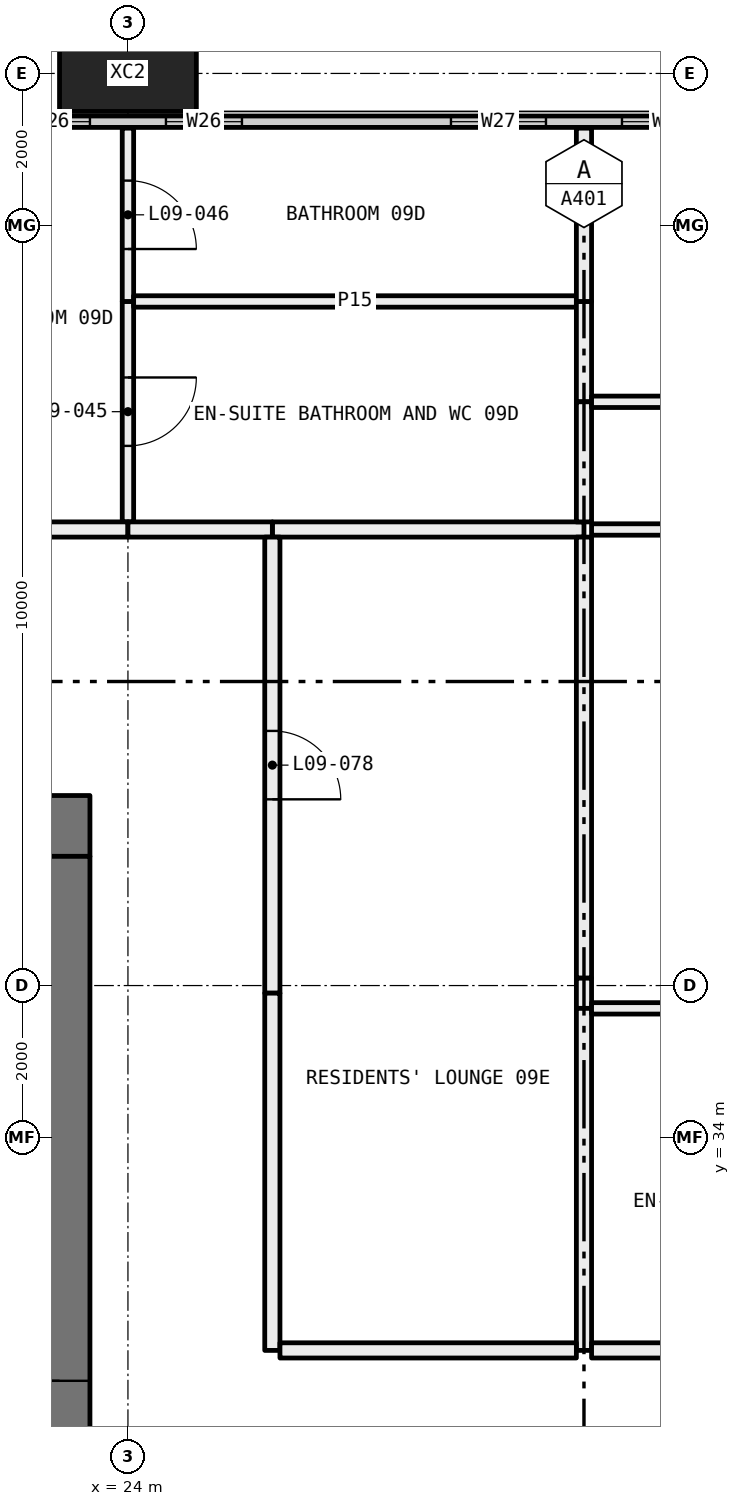
"""IFC4 building model, lengths in metres.
Left out: names, types, materials, properties, quantities, classifications, styles, units other than length and angle.
Written with IfcOpenShell. Run it as: python <this file> out.ifc"""

import sys

from ifc_helpers import new_model, si_unit, direction, frame, frame_2d, origin, origin_2d, place, context, subcontext, project, spatial, rectangle, hollow_rectangle, extrude, element, fill, save


model = new_model("IFC4")
c1 = context("Model", 3, precision=1e-05, world=origin(), true_north=direction((0.0, 1.0)))
c2 = subcontext(c1, "Body", "Model", "MODEL_VIEW")
j1 = project(units=[si_unit("LENGTHUNIT", "METRE"), si_unit("PLANEANGLEUNIT", "RADIAN")], contexts=[c1])
p1 = place(None, origin())
s1 = spatial("IfcSite", under=j1, at=p1, CompositionType="ELEMENT")
p2 = place(p1, origin())
s2 = spatial("IfcBuilding", under=s1, at=p2, CompositionType="ELEMENT")
p3 = place(p2, frame((0.0, 0.0, 43.8)))
s3 = spatial("IfcBuildingStorey", under=s2, at=p3, CompositionType="ELEMENT", Elevation=43.8)
p4 = place(p3, frame((24.0, 48.0, -0.4), z_axis=(0.0, 0.0, 1.0), x_axis=(1.0, 0.0, 0.0)))
e1 = element("IfcColumn", 1, at=p4, inside=s3, PredefinedType="COLUMN", context=c2, shape_type="SweptSolid", body=[
    extrude(hollow_rectangle(XDim=1.8, YDim=1.0, WallThickness=0.07, at=origin_2d()), origin(), (0.0, 0.0, 1.0), 3.45),
])
p5 = place(p3, frame((6.56, 47.365, 0.0), z_axis=(0.0, 0.0, 1.0), x_axis=(1.0, 0.0, 0.0)))
e2 = element("IfcWall", 2, at=p5, inside=s3, PredefinedType="ELEMENTEDWALL", context=c2, shape_type="SweptSolid", body=[
    extrude(rectangle(XDim=58.88, YDim=0.15, at=frame_2d((29.44, 0.0))), origin(), (0.0, 0.0, 1.0), 3.05),
])
p6 = place(p5, frame((0.44, 0.0, 0.45)))
e3 = element("IfcOpeningElement", 3, at=p6, cuts=e2, PredefinedType="OPENING", context=c2, shape_type="SweptSolid", body=[
    extrude(rectangle(XDim=4.5, YDim=2.55, at=frame_2d((2.25, 1.275))), frame((0.0, 0.085, 0.0), z_axis=(0.0, -1.0, 0.0), x_axis=(1.0, 0.0, 0.0)), (0.0, 0.0, 1.0), 0.17),
])
p7 = place(p5, frame((5.94, 0.0, 0.45)))
e4 = element("IfcOpeningElement", 4, at=p7, cuts=e2, PredefinedType="OPENING", context=c2, shape_type="SweptSolid", body=[
    extrude(rectangle(XDim=1.0, YDim=2.55, at=frame_2d((0.5, 1.275))), frame((0.0, 0.085, 0.0), z_axis=(0.0, -1.0, 0.0), x_axis=(1.0, 0.0, 0.0)), (0.0, 0.0, 1.0), 0.17),
])
p8 = place(p5, frame((9.69, 0.0, 0.45)))
e5 = element("IfcOpeningElement", 5, at=p8, cuts=e2, PredefinedType="OPENING", context=c2, shape_type="SweptSolid", body=[
    extrude(rectangle(XDim=1.25, YDim=2.55, at=frame_2d((0.625, 1.275))), frame((0.0, 0.085, 0.0), z_axis=(0.0, -1.0, 0.0), x_axis=(1.0, 0.0, 0.0)), (0.0, 0.0, 1.0), 0.17),
])
p9 = place(p5, frame((11.94, 0.0, 0.45)))
e6 = element("IfcOpeningElement", 6, at=p9, cuts=e2, PredefinedType="OPENING", context=c2, shape_type="SweptSolid", body=[
    extrude(rectangle(XDim=1.25, YDim=2.55, at=frame_2d((0.625, 1.275))), frame((0.0, 0.085, 0.0), z_axis=(0.0, -1.0, 0.0), x_axis=(1.0, 0.0, 0.0)), (0.0, 0.0, 1.0), 0.17),
])
p10 = place(p5, frame((15.94, 0.0, 0.45)))
e7 = element("IfcOpeningElement", 7, at=p10, cuts=e2, PredefinedType="OPENING", context=c2, shape_type="SweptSolid", body=[
    extrude(rectangle(XDim=1.0, YDim=2.55, at=frame_2d((0.5, 1.275))), frame((0.0, 0.085, 0.0), z_axis=(0.0, -1.0, 0.0), x_axis=(1.0, 0.0, 0.0)), (0.0, 0.0, 1.0), 0.17),
])
p11 = place(p5, frame((17.94, 0.0, 0.45)))
e8 = element("IfcOpeningElement", 8, at=p11, cuts=e2, PredefinedType="OPENING", context=c2, shape_type="SweptSolid", body=[
    extrude(rectangle(XDim=1.0, YDim=2.55, at=frame_2d((0.5, 1.275))), frame((0.0, 0.085, 0.0), z_axis=(0.0, -1.0, 0.0), x_axis=(1.0, 0.0, 0.0)), (0.0, 0.0, 1.0), 0.17),
])
p12 = place(p5, frame((21.69, 0.0, 0.45)))
e9 = element("IfcOpeningElement", 9, at=p12, cuts=e2, PredefinedType="OPENING", context=c2, shape_type="SweptSolid", body=[
    extrude(rectangle(XDim=1.25, YDim=2.55, at=frame_2d((0.625, 1.275))), frame((0.0, 0.085, 0.0), z_axis=(0.0, -1.0, 0.0), x_axis=(1.0, 0.0, 0.0)), (0.0, 0.0, 1.0), 0.17),
])
p13 = place(p5, frame((23.94, 0.0, 0.45)))
e10 = element("IfcOpeningElement", 10, at=p13, cuts=e2, PredefinedType="OPENING", context=c2, shape_type="SweptSolid", body=[
    extrude(rectangle(XDim=1.25, YDim=2.55, at=frame_2d((0.625, 1.275))), frame((0.0, 0.085, 0.0), z_axis=(0.0, -1.0, 0.0), x_axis=(1.0, 0.0, 0.0)), (0.0, 0.0, 1.0), 0.17),
])
p14 = place(p5, frame((27.94, 0.0, 0.45)))
e11 = element("IfcOpeningElement", 11, at=p14, cuts=e2, PredefinedType="OPENING", context=c2, shape_type="SweptSolid", body=[
    extrude(rectangle(XDim=1.0, YDim=2.55, at=frame_2d((0.5, 1.275))), frame((0.0, 0.085, 0.0), z_axis=(0.0, -1.0, 0.0), x_axis=(1.0, 0.0, 0.0)), (0.0, 0.0, 1.0), 0.17),
])
p15 = place(p5, frame((29.94, 0.0, 0.45)))
e12 = element("IfcOpeningElement", 12, at=p15, cuts=e2, PredefinedType="OPENING", context=c2, shape_type="SweptSolid", body=[
    extrude(rectangle(XDim=1.0, YDim=2.55, at=frame_2d((0.5, 1.275))), frame((0.0, 0.085, 0.0), z_axis=(0.0, -1.0, 0.0), x_axis=(1.0, 0.0, 0.0)), (0.0, 0.0, 1.0), 0.17),
])
p16 = place(p5, frame((33.69, 0.0, 0.45)))
e13 = element("IfcOpeningElement", 13, at=p16, cuts=e2, PredefinedType="OPENING", context=c2, shape_type="SweptSolid", body=[
    extrude(rectangle(XDim=1.25, YDim=2.55, at=frame_2d((0.625, 1.275))), frame((0.0, 0.085, 0.0), z_axis=(0.0, -1.0, 0.0), x_axis=(1.0, 0.0, 0.0)), (0.0, 0.0, 1.0), 0.17),
])
p17 = place(p5, frame((35.94, 0.0, 0.45)))
e14 = element("IfcOpeningElement", 14, at=p17, cuts=e2, PredefinedType="OPENING", context=c2, shape_type="SweptSolid", body=[
    extrude(rectangle(XDim=1.25, YDim=2.55, at=frame_2d((0.625, 1.275))), frame((0.0, 0.085, 0.0), z_axis=(0.0, -1.0, 0.0), x_axis=(1.0, 0.0, 0.0)), (0.0, 0.0, 1.0), 0.17),
])
p18 = place(p5, frame((39.94, 0.0, 0.45)))
e15 = element("IfcOpeningElement", 15, at=p18, cuts=e2, PredefinedType="OPENING", context=c2, shape_type="SweptSolid", body=[
    extrude(rectangle(XDim=1.0, YDim=2.55, at=frame_2d((0.5, 1.275))), frame((0.0, 0.085, 0.0), z_axis=(0.0, -1.0, 0.0), x_axis=(1.0, 0.0, 0.0)), (0.0, 0.0, 1.0), 0.17),
])
p19 = place(p5, frame((41.94, 0.0, 0.45)))
e16 = element("IfcOpeningElement", 16, at=p19, cuts=e2, PredefinedType="OPENING", context=c2, shape_type="SweptSolid", body=[
    extrude(rectangle(XDim=1.0, YDim=2.55, at=frame_2d((0.5, 1.275))), frame((0.0, 0.085, 0.0), z_axis=(0.0, -1.0, 0.0), x_axis=(1.0, 0.0, 0.0)), (0.0, 0.0, 1.0), 0.17),
])
p20 = place(p5, frame((45.69, 0.0, 0.45)))
e17 = element("IfcOpeningElement", 17, at=p20, cuts=e2, PredefinedType="OPENING", context=c2, shape_type="SweptSolid", body=[
    extrude(rectangle(XDim=1.25, YDim=2.55, at=frame_2d((0.625, 1.275))), frame((0.0, 0.085, 0.0), z_axis=(0.0, -1.0, 0.0), x_axis=(1.0, 0.0, 0.0)), (0.0, 0.0, 1.0), 0.17),
])
p21 = place(p5, frame((47.94, 0.0, 0.45)))
e18 = element("IfcOpeningElement", 18, at=p21, cuts=e2, PredefinedType="OPENING", context=c2, shape_type="SweptSolid", body=[
    extrude(rectangle(XDim=1.25, YDim=2.55, at=frame_2d((0.625, 1.275))), frame((0.0, 0.085, 0.0), z_axis=(0.0, -1.0, 0.0), x_axis=(1.0, 0.0, 0.0)), (0.0, 0.0, 1.0), 0.17),
])
p22 = place(p5, frame((51.94, 0.0, 0.45)))
e19 = element("IfcOpeningElement", 19, at=p22, cuts=e2, PredefinedType="OPENING", context=c2, shape_type="SweptSolid", body=[
    extrude(rectangle(XDim=1.0, YDim=2.55, at=frame_2d((0.5, 1.275))), frame((0.0, 0.085, 0.0), z_axis=(0.0, -1.0, 0.0), x_axis=(1.0, 0.0, 0.0)), (0.0, 0.0, 1.0), 0.17),
])
p23 = place(p5, frame((53.94, 0.0, 0.45)))
e20 = element("IfcOpeningElement", 20, at=p23, cuts=e2, PredefinedType="OPENING", context=c2, shape_type="SweptSolid", body=[
    extrude(rectangle(XDim=4.5, YDim=2.55, at=frame_2d((2.25, 1.275))), frame((0.0, 0.085, 0.0), z_axis=(0.0, -1.0, 0.0), x_axis=(1.0, 0.0, 0.0)), (0.0, 0.0, 1.0), 0.17),
])
p24 = place(p3, frame((24.0, 42.1, 0.0), z_axis=(0.0, 0.0, 1.0), x_axis=(0.0, 1.0, 0.0)))
e21 = element("IfcWall", 21, at=p24, inside=s3, PredefinedType="PARTITIONING", context=c2, shape_type="SweptSolid", body=[
    extrude(rectangle(XDim=2.9, YDim=0.15, at=frame_2d((1.45, 0.0))), origin(), (0.0, 0.0, 1.0), 3.05),
])
p25 = place(p24, frame((1.0, 0.0, 0.0)))
e22 = element("IfcOpeningElement", 22, at=p25, cuts=e21, PredefinedType="OPENING", context=c2, shape_type="SweptSolid", body=[
    extrude(rectangle(XDim=0.9, YDim=2.1, at=frame_2d((0.45, 1.05))), frame((0.0, 0.085, 0.0), z_axis=(0.0, -1.0, 0.0), x_axis=(1.0, 0.0, 0.0)), (0.0, 0.0, 1.0), 0.17),
])
p26 = place(p3, frame((24.0, 45.0, 0.0), z_axis=(0.0, 0.0, 1.0), x_axis=(0.0, 1.0, 0.0)))
e23 = element("IfcWall", 23, at=p26, inside=s3, PredefinedType="PARTITIONING", context=c2, shape_type="SweptSolid", body=[
    extrude(rectangle(XDim=2.28, YDim=0.15, at=frame_2d((1.14, 0.0))), origin(), (0.0, 0.0, 1.0), 3.05),
])
p27 = place(p26, frame((0.69, 0.0, 0.0)))
e24 = element("IfcOpeningElement", 24, at=p27, cuts=e23, PredefinedType="OPENING", context=c2, shape_type="SweptSolid", body=[
    extrude(rectangle(XDim=0.9, YDim=2.1, at=frame_2d((0.45, 1.05))), frame((0.0, 0.085, 0.0), z_axis=(0.0, -1.0, 0.0), x_axis=(1.0, 0.0, 0.0)), (0.0, 0.0, 1.0), 0.17),
])
p28 = place(p3, frame((18.0, 42.0, 0.0), z_axis=(0.0, 0.0, 1.0), x_axis=(1.0, 0.0, 0.0)))
e25 = element("IfcWall", 25, at=p28, inside=s3, PredefinedType="PARTITIONING", context=c2, shape_type="SweptSolid", body=[
    extrude(rectangle(XDim=6.0, YDim=0.2, at=frame_2d((3.0, 0.0))), origin(), (0.0, 0.0, 1.0), 3.05),
])
p29 = place(p3, frame((29.9, 45.0, 0.0), z_axis=(0.0, 0.0, 1.0), x_axis=(-1.0, 0.0, 0.0)))
e26 = element("IfcWall", 26, at=p29, inside=s3, PredefinedType="PARTITIONING", context=c2, shape_type="SweptSolid", body=[
    extrude(rectangle(XDim=5.825, YDim=0.15, at=frame_2d((2.913, 0.0))), origin(), (0.0, 0.0, 1.0), 3.05),
])
p30 = place(p3, frame((25.9, 42.0, 0.0), z_axis=(0.0, 0.0, 1.0), x_axis=(1.0, 0.0, 0.0)))
e27 = element("IfcWall", 27, at=p30, inside=s3, PredefinedType="PARTITIONING", context=c2, shape_type="SweptSolid", body=[
    extrude(rectangle(XDim=4.1, YDim=0.2, at=frame_2d((2.05, 0.0))), origin(), (0.0, 0.0, 1.0), 3.05),
])
p31 = place(p3, frame((30.0, 43.68, 0.0), z_axis=(0.0, 0.0, 1.0), x_axis=(0.0, 1.0, 0.0)))
e28 = element("IfcWall", 28, at=p31, inside=s3, PredefinedType="PARTITIONING", context=c2, shape_type="SweptSolid", body=[
    extrude(rectangle(XDim=1.32, YDim=0.2, at=frame_2d((0.66, 0.0))), origin(), (0.0, 0.0, 1.0), 3.05),
])
p32 = place(p3, frame((30.0, 42.1, 0.0), z_axis=(0.0, 0.0, 1.0), x_axis=(0.0, 1.0, 0.0)))
e29 = element("IfcWall", 29, at=p32, inside=s3, PredefinedType="PARTITIONING", context=c2, shape_type="SweptSolid", body=[
    extrude(rectangle(XDim=1.58, YDim=0.2, at=frame_2d((0.79, 0.0))), origin(), (0.0, 0.0, 1.0), 3.05),
])
p33 = place(p3, frame((24.0, 42.0, 0.0), z_axis=(0.0, 0.0, 1.0), x_axis=(1.0, 0.0, 0.0)))
e30 = element("IfcWall", 30, at=p33, inside=s3, PredefinedType="PARTITIONING", context=c2, shape_type="SweptSolid", body=[
    extrude(rectangle(XDim=1.9, YDim=0.2, at=frame_2d((0.95, 0.0))), origin(), (0.0, 0.0, 1.0), 3.05),
])
p34 = place(p3, frame((30.0, 45.0, 0.0), z_axis=(0.0, 0.0, 1.0), x_axis=(0.0, 1.0, 0.0)))
e31 = element("IfcWall", 31, at=p34, inside=s3, PredefinedType="PARTITIONING", context=c2, shape_type="SweptSolid", body=[
    extrude(rectangle(XDim=2.28, YDim=0.2, at=frame_2d((1.14, 0.0))), origin(), (0.0, 0.0, 1.0), 3.05),
])
p35 = place(p3, frame((30.0, 35.7, 0.0), z_axis=(0.0, 0.0, 1.0), x_axis=(0.0, 1.0, 0.0)))
e32 = element("IfcWall", 32, at=p35, inside=s3, PredefinedType="PARTITIONING", context=c2, shape_type="SweptSolid", body=[
    extrude(rectangle(XDim=0.4, YDim=0.2, at=frame_2d((0.2, 0.0))), origin(), (0.0, 0.0, 1.0), 2.45),
])
p36 = place(p3, frame((30.0, 36.1, 0.0), z_axis=(0.0, 0.0, 1.0), x_axis=(0.0, 1.0, 0.0)))
e33 = element("IfcWall", 33, at=p36, inside=s3, PredefinedType="PARTITIONING", context=c2, shape_type="SweptSolid", body=[
    extrude(rectangle(XDim=5.8, YDim=0.2, at=frame_2d((2.9, 0.0))), origin(), (0.0, 0.0, 1.0), 3.05),
])
p37 = place(p3, frame((30.0, 31.2, 0.0), z_axis=(0.0, 0.0, 1.0), x_axis=(0.0, 1.0, 0.0)))
e34 = element("IfcWall", 34, at=p37, inside=s3, PredefinedType="PARTITIONING", context=c2, shape_type="SweptSolid", body=[
    extrude(rectangle(XDim=4.5, YDim=0.2, at=frame_2d((2.25, 0.0))), origin(), (0.0, 0.0, 1.0), 3.05),
])
p38 = place(p3, frame((25.9, 41.9, 0.0), z_axis=(0.0, 0.0, 1.0), x_axis=(0.0, -1.0, 0.0)))
e35 = element("IfcWall", 35, at=p38, inside=s3, PredefinedType="PARTITIONING", context=c2, shape_type="SweptSolid", body=[
    extrude(rectangle(XDim=6.0, YDim=0.2, at=frame_2d((3.0, 0.0))), origin(), (0.0, 0.0, 1.0), 2.45),
])
p39 = place(p38, frame((2.55, 0.0, 0.0)))
e36 = element("IfcOpeningElement", 36, at=p39, cuts=e35, PredefinedType="OPENING", context=c2, shape_type="SweptSolid", body=[
    extrude(rectangle(XDim=0.9, YDim=2.1, at=frame_2d((0.45, 1.05))), frame((0.0, 0.11, 0.0), z_axis=(0.0, -1.0, 0.0), x_axis=(1.0, 0.0, 0.0)), (0.0, 0.0, 1.0), 0.22),
])
p40 = place(p3, frame((25.9, 35.9, 0.0), z_axis=(0.0, 0.0, 1.0), x_axis=(0.0, -1.0, 0.0)))
e37 = element("IfcWall", 37, at=p40, inside=s3, PredefinedType="PARTITIONING", context=c2, shape_type="SweptSolid", body=[
    extrude(rectangle(XDim=4.7, YDim=0.2, at=frame_2d((2.35, 0.0))), origin(), (0.0, 0.0, 1.0), 3.05),
])
p41 = place(p3, frame((26.0, 31.2, 0.0), z_axis=(0.0, 0.0, 1.0), x_axis=(1.0, 0.0, 0.0)))
e38 = element("IfcWall", 38, at=p41, inside=s3, PredefinedType="PARTITIONING", context=c2, shape_type="SweptSolid", body=[
    extrude(rectangle(XDim=3.9, YDim=0.2, at=frame_2d((1.95, 0.0))), origin(), (0.0, 0.0, 1.0), 3.05),
])
p42 = place(p3, frame((30.1, 43.68, 0.0), z_axis=(0.0, 0.0, 1.0), x_axis=(1.0, 0.0, 0.0)))
e39 = element("IfcWall", 39, at=p42, inside=s3, PredefinedType="PARTITIONING", context=c2, shape_type="SweptSolid", body=[
    extrude(rectangle(XDim=5.9, YDim=0.15, at=frame_2d((2.95, 0.0))), origin(), (0.0, 0.0, 1.0), 2.45),
])
p43 = place(p3, frame((30.1, 42.0, 0.0), z_axis=(0.0, 0.0, 1.0), x_axis=(1.0, 0.0, 0.0)))
e40 = element("IfcWall", 40, at=p43, inside=s3, PredefinedType="PARTITIONING", context=c2, shape_type="SweptSolid", body=[
    extrude(rectangle(XDim=5.825, YDim=0.15, at=frame_2d((2.913, 0.0))), origin(), (0.0, 0.0, 1.0), 2.45),
])
p44 = place(p3, frame((30.1, 35.7, 0.0), z_axis=(0.0, 0.0, 1.0), x_axis=(1.0, 0.0, 0.0)))
e41 = element("IfcWall", 41, at=p44, inside=s3, PredefinedType="PARTITIONING", context=c2, shape_type="SweptSolid", body=[
    extrude(rectangle(XDim=4.4, YDim=0.15, at=frame_2d((2.2, 0.0))), origin(), (0.0, 0.0, 1.0), 3.05),
])
p45 = place(p44, frame((1.75, 0.0, 0.0)))
e42 = element("IfcOpeningElement", 42, at=p45, cuts=e41, PredefinedType="OPENING", context=c2, shape_type="SweptSolid", body=[
    extrude(rectangle(XDim=0.9, YDim=2.1, at=frame_2d((0.45, 1.05))), frame((0.0, 0.085, 0.0), z_axis=(0.0, -1.0, 0.0), x_axis=(1.0, 0.0, 0.0)), (0.0, 0.0, 1.0), 0.17),
])
p46 = place(p3, frame((30.1, 31.2, 0.0), z_axis=(0.0, 0.0, 1.0), x_axis=(1.0, 0.0, 0.0)))
e43 = element("IfcWall", 43, at=p46, inside=s3, PredefinedType="PARTITIONING", context=c2, shape_type="SweptSolid", body=[
    extrude(rectangle(XDim=4.4, YDim=0.2, at=frame_2d((2.2, 0.0))), origin(), (0.0, 0.0, 1.0), 3.05),
])
p47 = place(p3, frame((12.5, 38.1, 0.0), z_axis=(0.0, 0.0, 1.0), x_axis=(1.0, 0.0, 0.0)))
e44 = element("IfcWall", 44, at=p47, inside=s3, PredefinedType="SHEAR", context=c2, shape_type="SweptSolid", body=[
    extrude(rectangle(XDim=11.0, YDim=0.8, at=frame_2d((5.5, 0.0))), origin(), (0.0, 0.0, 1.0), 3.05),
])
p48 = place(p47, frame((8.4, 0.0, 0.0)))
e45 = element("IfcOpeningElement", 45, at=p48, cuts=e44, PredefinedType="OPENING", context=c2, shape_type="SweptSolid", body=[
    extrude(rectangle(XDim=1.6, YDim=2.1, at=frame_2d((0.8, 1.05))), frame((0.0, 0.41, 0.0), z_axis=(0.0, -1.0, 0.0), x_axis=(1.0, 0.0, 0.0)), (0.0, 0.0, 1.0), 0.82),
])
p49 = place(p3, frame((23.1, 22.3, 0.0), z_axis=(0.0, 0.0, 1.0), x_axis=(0.0, 1.0, 0.0)))
e46 = element("IfcWall", 46, at=p49, inside=s3, PredefinedType="SHEAR", context=c2, shape_type="SweptSolid", body=[
    extrude(rectangle(XDim=15.4, YDim=0.8, at=frame_2d((7.7, 0.0))), origin(), (0.0, 0.0, 1.0), 3.05),
])
p50 = place(p49, frame((6.9, 0.0, 0.0)))
e47 = element("IfcOpeningElement", 47, at=p50, cuts=e46, PredefinedType="OPENING", context=c2, shape_type="SweptSolid", body=[
    extrude(rectangle(XDim=1.6, YDim=2.1, at=frame_2d((0.8, 1.05))), frame((0.0, 0.41, 0.0), z_axis=(0.0, -1.0, 0.0), x_axis=(1.0, 0.0, 0.0)), (0.0, 0.0, 1.0), 0.82),
])
p51 = place(p10, origin())
e48 = element("IfcWindow", 48, at=p51, inside=s3, PartitioningType="SINGLE_PANEL", PredefinedType="WINDOW", context=c2, shape_type="SweptSolid", body=[
    extrude(rectangle(XDim=1.0, YDim=2.55, at=frame_2d((0.5, 1.275))), frame((0.0, 0.03, 0.0), z_axis=(0.0, -1.0, 0.0), x_axis=(1.0, 0.0, 0.0)), (0.0, 0.0, 1.0), 0.06),
])
fill(e7, e48)
p52 = place(p11, origin())
e49 = element("IfcWindow", 49, at=p52, inside=s3, PartitioningType="SINGLE_PANEL", PredefinedType="WINDOW", context=c2, shape_type="SweptSolid", body=[
    extrude(rectangle(XDim=1.0, YDim=2.55, at=frame_2d((0.5, 1.275))), frame((0.0, 0.03, 0.0), z_axis=(0.0, -1.0, 0.0), x_axis=(1.0, 0.0, 0.0)), (0.0, 0.0, 1.0), 0.06),
])
fill(e8, e49)
p53 = place(p12, origin())
e50 = element("IfcWindow", 50, at=p53, inside=s3, PartitioningType="SINGLE_PANEL", PredefinedType="WINDOW", context=c2, shape_type="SweptSolid", body=[
    extrude(rectangle(XDim=1.25, YDim=2.55, at=frame_2d((0.625, 1.275))), frame((0.0, 0.03, 0.0), z_axis=(0.0, -1.0, 0.0), x_axis=(1.0, 0.0, 0.0)), (0.0, 0.0, 1.0), 0.06),
])
fill(e9, e50)
p54 = place(p13, origin())
e51 = element("IfcWindow", 51, at=p54, inside=s3, PartitioningType="SINGLE_PANEL", PredefinedType="WINDOW", context=c2, shape_type="SweptSolid", body=[
    extrude(rectangle(XDim=1.25, YDim=2.55, at=frame_2d((0.625, 1.275))), frame((0.0, 0.03, 0.0), z_axis=(0.0, -1.0, 0.0), x_axis=(1.0, 0.0, 0.0)), (0.0, 0.0, 1.0), 0.06),
])
fill(e10, e51)
p55 = place(p25, frame((0.9, 0.0, 0.0), x_axis=(-1.0, 0.0, 0.0)))
e52 = element("IfcDoor", 52, at=p55, inside=s3, OperationType="SINGLE_SWING_RIGHT", PredefinedType="DOOR", context=c2, shape_type="SweptSolid", body=[
    extrude(rectangle(XDim=0.9, YDim=2.1, at=frame_2d((0.45, 1.05))), frame((0.0, 0.025, 0.0), z_axis=(0.0, -1.0, 0.0), x_axis=(1.0, 0.0, 0.0)), (0.0, 0.0, 1.0), 0.05),
])
fill(e22, e52)
p56 = place(p27, frame((0.9, 0.0, 0.0), x_axis=(-1.0, 0.0, 0.0)))
e53 = element("IfcDoor", 53, at=p56, inside=s3, OperationType="SINGLE_SWING_LEFT", PredefinedType="DOOR", context=c2, shape_type="SweptSolid", body=[
    extrude(rectangle(XDim=0.9, YDim=2.1, at=frame_2d((0.45, 1.05))), frame((0.0, 0.025, 0.0), z_axis=(0.0, -1.0, 0.0), x_axis=(1.0, 0.0, 0.0)), (0.0, 0.0, 1.0), 0.05),
])
fill(e24, e53)
p57 = place(p39, origin())
e54 = element("IfcDoor", 54, at=p57, inside=s3, OperationType="SINGLE_SWING_LEFT", PredefinedType="DOOR", context=c2, shape_type="SweptSolid", body=[
    extrude(rectangle(XDim=0.9, YDim=2.1, at=frame_2d((0.45, 1.05))), frame((0.0, 0.025, 0.0), z_axis=(0.0, -1.0, 0.0), x_axis=(1.0, 0.0, 0.0)), (0.0, 0.0, 1.0), 0.05),
])
fill(e36, e54)
p58 = place(p50, origin())
e55 = element("IfcDoor", 55, at=p58, inside=s3, OperationType="DOUBLE_DOOR_SINGLE_SWING", PredefinedType="DOOR", context=c2, shape_type="SweptSolid", body=[
    extrude(rectangle(XDim=1.6, YDim=2.1, at=frame_2d((0.8, 1.05))), frame((0.0, 0.025, 0.0), z_axis=(0.0, -1.0, 0.0), x_axis=(1.0, 0.0, 0.0)), (0.0, 0.0, 1.0), 0.05),
])
fill(e47, e55)
save(model, sys.argv[1])
